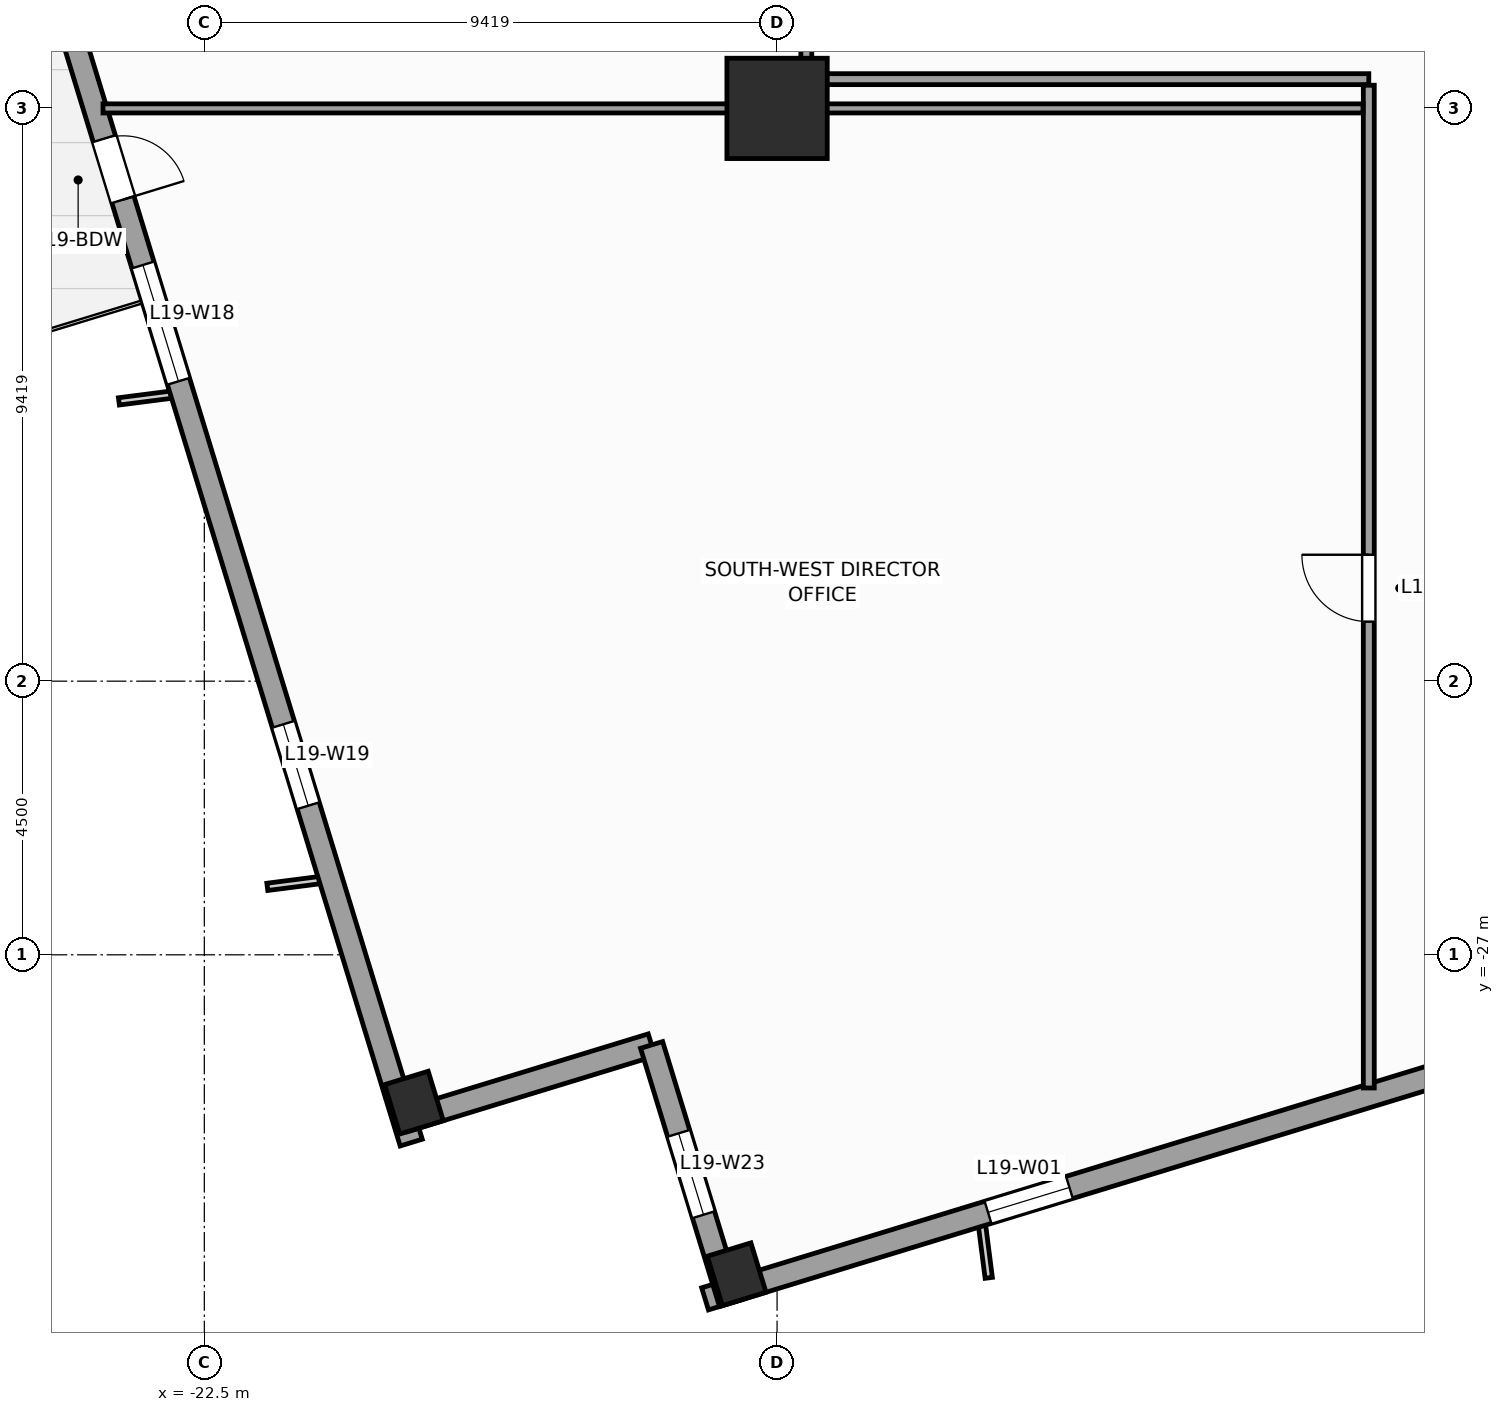
"""IFC4 building model, lengths in metres.
Left out: names, types, materials, properties, quantities, classifications, styles, units other than length and angle.
Written with IfcOpenShell. Run it as: python <this file> out.ifc"""

import sys

from ifc_helpers import new_model, si_unit, direction, frame, frame_2d, origin, origin_2d, place, context, subcontext, project, spatial, rectangle, extrude, source, transform, mapped, element, fill, save


model = new_model("IFC4")
c1 = context("Model", 3, precision=1e-05, world=origin(), true_north=direction((0.0, 1.0)))
c2 = subcontext(c1, "Body", "Model", "MODEL_VIEW")
j1 = project(units=[si_unit("LENGTHUNIT", "METRE"), si_unit("PLANEANGLEUNIT", "RADIAN")], contexts=[c1])
p1 = place(None, origin())
s1 = spatial("IfcSite", under=j1, at=p1, CompositionType="ELEMENT")
p2 = place(p1, origin())
s2 = spatial("IfcBuilding", under=s1, at=p2, CompositionType="ELEMENT")
p3 = place(p2, frame((0.0, 0.0, 83.2)))
s3 = spatial("IfcBuildingStorey", under=s2, at=p3, CompositionType="ELEMENT", Elevation=83.2)
m1 = source(origin(), c2, "Body", "SweptSolid", [
    extrude(rectangle(XDim=1.65, YDim=1.65, at=origin_2d()), origin(), (0.0, 0.0, 1.0), 4.0),
])
p4 = place(p3, frame((-13.081, -13.081, 0.0), z_axis=(0.0, 0.0, 1.0), x_axis=(1.0, 0.0, 0.0)))
e1 = element("IfcColumn", 1, at=p4, inside=s3, PredefinedType="COLUMN", context=c2, shape_type="MappedRepresentation", body=[
    mapped(m1, transform((0.0, 0.0, 0.0), scale=1.0)),
])
m2 = source(origin(), c2, "Body", "SweptSolid", [
    extrude(rectangle(XDim=0.75, YDim=0.85, at=origin_2d()), origin(), (0.0, 0.0, 1.0), 4.0),
])
for number, where, z_axis, x_axis in (
    (2, (-13.746, -32.253, 0.0), (0.0, 0.0, 1.0), (0.956, 0.292, 0.0)),
    (3, (-19.052, -29.431, 0.0), (0.0, 0.0, 1.0), (0.956, 0.292, 0.0)),
):
    element("IfcColumn", number, at=place(p3, frame(where, z_axis=z_axis, x_axis=x_axis)), inside=s3, PredefinedType="COLUMN", context=c2, shape_type="MappedRepresentation", body=[
        mapped(m2, transform((0.0, 0.0, 0.0), scale=1.0)),
    ])
p5 = place(p3, frame((-14.265, -32.658, 0.0), z_axis=(0.0, 0.0, 1.0), x_axis=(0.956304320851, 0.292373127906, 0.0)))
e4 = element("IfcWall", 4, at=p5, inside=s3, PredefinedType="STANDARD", context=c2, shape_type="SweptSolid", body=[
    extrude(rectangle(XDim=46.38, YDim=0.38, at=frame_2d((23.19, 0.0))), origin(), (0.0, 0.0, 1.0), 3.14),
])
p6 = place(p5, frame((4.865, 0.0, 0.51)))
e5 = element("IfcOpeningElement", 5, at=p6, cuts=e4, PredefinedType="OPENING", context=c2, shape_type="SweptSolid", body=[
    extrude(rectangle(XDim=1.4, YDim=2.4, at=frame_2d((0.7, 1.2))), frame((0.0, 0.2, 0.0), z_axis=(0.0, -1.0, 0.0), x_axis=(1.0, 0.0, 0.0)), (0.0, 0.0, 1.0), 0.4),
])
p7 = place(p5, frame((14.7, 0.0, 0.51)))
e6 = element("IfcOpeningElement", 6, at=p7, cuts=e4, PredefinedType="OPENING", context=c2, shape_type="SweptSolid", body=[
    extrude(rectangle(XDim=2.0, YDim=2.4, at=frame_2d((1.0, 1.2))), frame((0.0, 0.2, 0.0), z_axis=(0.0, -1.0, 0.0), x_axis=(1.0, 0.0, 0.0)), (0.0, 0.0, 1.0), 0.4),
])
p8 = place(p5, frame((20.512, 0.0, 0.51)))
e7 = element("IfcOpeningElement", 7, at=p8, cuts=e4, PredefinedType="OPENING", context=c2, shape_type="SweptSolid", body=[
    extrude(rectangle(XDim=2.0, YDim=2.4, at=frame_2d((1.0, 1.2))), frame((0.0, 0.2, 0.0), z_axis=(0.0, -1.0, 0.0), x_axis=(1.0, 0.0, 0.0)), (0.0, 0.0, 1.0), 0.4),
])
p9 = place(p5, frame((30.538, 0.0, 0.51)))
e8 = element("IfcOpeningElement", 8, at=p9, cuts=e4, PredefinedType="OPENING", context=c2, shape_type="SweptSolid", body=[
    extrude(rectangle(XDim=2.0, YDim=2.4, at=frame_2d((1.0, 1.2))), frame((0.0, 0.2, 0.0), z_axis=(0.0, -1.0, 0.0), x_axis=(1.0, 0.0, 0.0)), (0.0, 0.0, 1.0), 0.4),
])
p10 = place(p5, frame((39.187, 0.0, 0.51)))
e9 = element("IfcOpeningElement", 9, at=p10, cuts=e4, PredefinedType="OPENING", context=c2, shape_type="SweptSolid", body=[
    extrude(rectangle(XDim=1.4, YDim=2.4, at=frame_2d((0.7, 1.2))), frame((0.0, 0.2, 0.0), z_axis=(0.0, -1.0, 0.0), x_axis=(1.0, 0.0, 0.0)), (0.0, 0.0, 1.0), 0.4),
])
p11 = place(p3, frame((-32.658, 14.265, 0.0), z_axis=(0.0, 0.0, 1.0), x_axis=(0.292373127906, -0.956304320851, 0.0)))
e10 = element("IfcWall", 10, at=p11, inside=s3, PredefinedType="STANDARD", context=c2, shape_type="SweptSolid", body=[
    extrude(rectangle(XDim=46.38, YDim=0.38, at=frame_2d((23.19, 0.0))), origin(), (0.0, 0.0, 1.0), 3.14),
])
p12 = place(p11, frame((29.115, 0.0, 0.0)))
e11 = element("IfcOpeningElement", 11, at=p12, cuts=e10, PredefinedType="OPENING", context=c2, shape_type="SweptSolid", body=[
    extrude(rectangle(XDim=1.05, YDim=2.25, at=frame_2d((0.525, 1.125))), frame((0.0, 0.2, 0.0), z_axis=(0.0, -1.0, 0.0), x_axis=(1.0, 0.0, 0.0)), (0.0, 0.0, 1.0), 0.4),
])
p13 = place(p11, frame((4.865, 0.0, 0.51)))
e12 = element("IfcOpeningElement", 12, at=p13, cuts=e10, PredefinedType="OPENING", context=c2, shape_type="SweptSolid", body=[
    extrude(rectangle(XDim=1.4, YDim=2.4, at=frame_2d((0.7, 1.2))), frame((0.0, 0.2, 0.0), z_axis=(0.0, -1.0, 0.0), x_axis=(1.0, 0.0, 0.0)), (0.0, 0.0, 1.0), 0.4),
])
p14 = place(p11, frame((10.95, 0.0, 0.51)))
e13 = element("IfcOpeningElement", 13, at=p14, cuts=e10, PredefinedType="OPENING", context=c2, shape_type="SweptSolid", body=[
    extrude(rectangle(XDim=2.0, YDim=2.4, at=frame_2d((1.0, 1.2))), frame((0.0, 0.2, 0.0), z_axis=(0.0, -1.0, 0.0), x_axis=(1.0, 0.0, 0.0)), (0.0, 0.0, 1.0), 0.4),
])
p15 = place(p11, frame((19.012, 0.0, 0.51)))
e14 = element("IfcOpeningElement", 14, at=p15, cuts=e10, PredefinedType="OPENING", context=c2, shape_type="SweptSolid", body=[
    extrude(rectangle(XDim=2.0, YDim=2.4, at=frame_2d((1.0, 1.2))), frame((0.0, 0.2, 0.0), z_axis=(0.0, -1.0, 0.0), x_axis=(1.0, 0.0, 0.0)), (0.0, 0.0, 1.0), 0.4),
])
p16 = place(p11, frame((31.288, 0.0, 0.51)))
e15 = element("IfcOpeningElement", 15, at=p16, cuts=e10, PredefinedType="OPENING", context=c2, shape_type="SweptSolid", body=[
    extrude(rectangle(XDim=2.0, YDim=2.4, at=frame_2d((1.0, 1.2))), frame((0.0, 0.2, 0.0), z_axis=(0.0, -1.0, 0.0), x_axis=(1.0, 0.0, 0.0)), (0.0, 0.0, 1.0), 0.4),
])
p17 = place(p11, frame((39.187, 0.0, 0.51)))
e16 = element("IfcOpeningElement", 16, at=p17, cuts=e10, PredefinedType="OPENING", context=c2, shape_type="SweptSolid", body=[
    extrude(rectangle(XDim=1.4, YDim=2.4, at=frame_2d((0.7, 1.2))), frame((0.0, 0.2, 0.0), z_axis=(0.0, -1.0, 0.0), x_axis=(1.0, 0.0, 0.0)), (0.0, 0.0, 1.0), 0.4),
])
p18 = place(p3, frame((-19.208, -29.725, 0.0), z_axis=(0.0, 0.0, 1.0), x_axis=(0.956312764915, 0.292345507338, 0.0)))
e17 = element("IfcWall", 17, at=p18, inside=s3, PredefinedType="STANDARD", context=c2, shape_type="SweptSolid", body=[
    extrude(rectangle(XDim=4.25, YDim=0.38, at=frame_2d((2.125, 0.0))), origin(), (0.0, 0.0, 1.0), 3.74),
])
p19 = place(p3, frame((-15.144, -28.482, 0.0), z_axis=(0.0, 0.0, 1.0), x_axis=(0.292373601522, -0.956304176051, 0.0)))
e18 = element("IfcWall", 18, at=p19, inside=s3, PredefinedType="STANDARD", context=c2, shape_type="SweptSolid", body=[
    extrude(rectangle(XDim=4.44, YDim=0.38, at=frame_2d((2.22, 0.0))), origin(), (0.0, 0.0, 1.0), 3.04),
])
p20 = place(p19, frame((1.52, 0.0, 0.51)))
e19 = element("IfcOpeningElement", 19, at=p20, cuts=e18, PredefinedType="OPENING", context=c2, shape_type="SweptSolid", body=[
    extrude(rectangle(XDim=1.4, YDim=2.4, at=frame_2d((0.7, 1.2))), frame((0.0, 0.2, 0.0), z_axis=(0.0, -1.0, 0.0), x_axis=(1.0, 0.0, 0.0)), (0.0, 0.0, 1.0), 0.4),
])
p21 = place(p3, frame((-12.6, -12.6, 0.0), z_axis=(0.0, 0.0, 1.0), x_axis=(1.0, 0.0, 0.0)))
e20 = element("IfcWall", 20, at=p21, inside=s3, PredefinedType="PARTITIONING", context=c2, shape_type="SweptSolid", body=[
    extrude(rectangle(XDim=9.25, YDim=0.18, at=frame_2d((4.625, 0.0))), origin(), (0.0, 0.0, 1.0), 3.74),
])
p22 = place(p3, frame((-12.6, -12.6, 0.0), z_axis=(0.0, 0.0, 1.0), x_axis=(0.0, 1.0, 0.0)))
e21 = element("IfcWall", 21, at=p22, inside=s3, PredefinedType="PARTITIONING", context=c2, shape_type="SweptSolid", body=[
    extrude(rectangle(XDim=11.45, YDim=0.18, at=frame_2d((5.725, 0.0))), origin(), (0.0, 0.0, 1.0), 3.74),
])
p23 = place(p22, frame((2.514, 0.0, 0.0)))
e22 = element("IfcOpeningElement", 22, at=p23, cuts=e21, PredefinedType="OPENING", context=c2, shape_type="SweptSolid", body=[
    extrude(rectangle(XDim=1.1, YDim=2.2, at=frame_2d((0.55, 1.1))), frame((0.0, 0.1, 0.0), z_axis=(0.0, -1.0, 0.0), x_axis=(1.0, 0.0, 0.0)), (0.0, 0.0, 1.0), 0.2),
])
p24 = place(p3, frame((-3.35, -29.19, 0.0), z_axis=(0.0, 0.0, 1.0), x_axis=(0.0, 1.0, 0.0)))
e23 = element("IfcWall", 23, at=p24, inside=s3, PredefinedType="PARTITIONING", context=c2, shape_type="SweptSolid", body=[
    extrude(rectangle(XDim=16.49, YDim=0.18, at=frame_2d((8.245, 0.0))), origin(), (0.0, 0.0, 1.0), 3.74),
])
p25 = place(p24, frame((7.669, 0.0, 0.0)))
e24 = element("IfcOpeningElement", 24, at=p25, cuts=e23, PredefinedType="OPENING", context=c2, shape_type="SweptSolid", body=[
    extrude(rectangle(XDim=1.1, YDim=2.2, at=frame_2d((0.55, 1.1))), frame((0.0, 0.1, 0.0), z_axis=(0.0, -1.0, 0.0), x_axis=(1.0, 0.0, 0.0)), (0.0, 0.0, 1.0), 0.2),
])
p26 = place(p3, frame((-24.167, -13.081, 0.0), z_axis=(0.0, 0.0, 1.0), x_axis=(1.0, 0.0, 0.0)))
e25 = element("IfcWall", 25, at=p26, inside=s3, PredefinedType="PARTITIONING", context=c2, shape_type="SweptSolid", body=[
    extrude(rectangle(XDim=20.721, YDim=0.15, at=frame_2d((10.361, 0.0))), origin(), (0.0, 0.0, 1.0), 2.732),
])
m3 = source(origin(), c2, "Body", "SweptSolid", [
    extrude(rectangle(XDim=1.4, YDim=2.4, at=frame_2d((0.7, 1.2))), frame((0.0, 0.03, 0.0), z_axis=(0.0, -1.0, 0.0), x_axis=(1.0, 0.0, 0.0)), (0.0, 0.0, 1.0), 0.06),
])
p27 = place(p6, origin())
e26 = element("IfcWindow", 26, at=p27, inside=s3, PartitioningType="SINGLE_PANEL", PredefinedType="WINDOW", context=c2, shape_type="MappedRepresentation", body=[
    mapped(m3, transform((0.0, 0.0, 0.0), scale=1.0)),
])
fill(e5, e26)
m4 = source(origin(), c2, "Body", "SweptSolid", [
    extrude(rectangle(XDim=1.05, YDim=2.25, at=frame_2d((0.525, 1.125))), frame((0.0, 0.025, 0.0), z_axis=(0.0, -1.0, 0.0), x_axis=(1.0, 0.0, 0.0)), (0.0, 0.0, 1.0), 0.05),
])
p28 = place(p12, origin())
e27 = element("IfcDoor", 27, at=p28, inside=s3, OperationType="SINGLE_SWING_RIGHT", PredefinedType="DOOR", context=c2, shape_type="MappedRepresentation", body=[
    mapped(m4, transform((0.0, 0.0, 0.0), scale=1.0)),
])
fill(e11, e27)
m5 = source(origin(), c2, "Body", "SweptSolid", [
    extrude(rectangle(XDim=2.0, YDim=2.4, at=frame_2d((1.0, 1.2))), frame((0.0, 0.03, 0.0), z_axis=(0.0, -1.0, 0.0), x_axis=(1.0, 0.0, 0.0)), (0.0, 0.0, 1.0), 0.06),
])
p29 = place(p16, origin())
e28 = element("IfcWindow", 28, at=p29, inside=s3, PartitioningType="SINGLE_PANEL", PredefinedType="WINDOW", context=c2, shape_type="MappedRepresentation", body=[
    mapped(m5, transform((0.0, 0.0, 0.0), scale=1.0)),
])
fill(e15, e28)
p30 = place(p17, origin())
e29 = element("IfcWindow", 29, at=p30, inside=s3, PartitioningType="SINGLE_PANEL", PredefinedType="WINDOW", context=c2, shape_type="MappedRepresentation", body=[
    mapped(m3, transform((0.0, 0.0, 0.0), scale=1.0)),
])
fill(e16, e29)
p31 = place(p20, origin())
e30 = element("IfcWindow", 30, at=p31, inside=s3, PartitioningType="SINGLE_PANEL", PredefinedType="WINDOW", context=c2, shape_type="MappedRepresentation", body=[
    mapped(m3, transform((0.0, 0.0, 0.0), scale=1.0)),
])
fill(e19, e30)
m6 = source(origin(), c2, "Body", "SweptSolid", [
    extrude(rectangle(XDim=1.1, YDim=2.2, at=frame_2d((0.55, 1.1))), frame((0.0, 0.025, 0.0), z_axis=(0.0, -1.0, 0.0), x_axis=(1.0, 0.0, 0.0)), (0.0, 0.0, 1.0), 0.05),
])
p32 = place(p25, origin())
e31 = element("IfcDoor", 31, at=p32, inside=s3, OperationType="SINGLE_SWING_RIGHT", PredefinedType="DOOR", context=c2, shape_type="MappedRepresentation", body=[
    mapped(m6, transform((0.0, 0.0, 0.0), scale=1.0)),
])
fill(e24, e31)
save(model, sys.argv[1])
